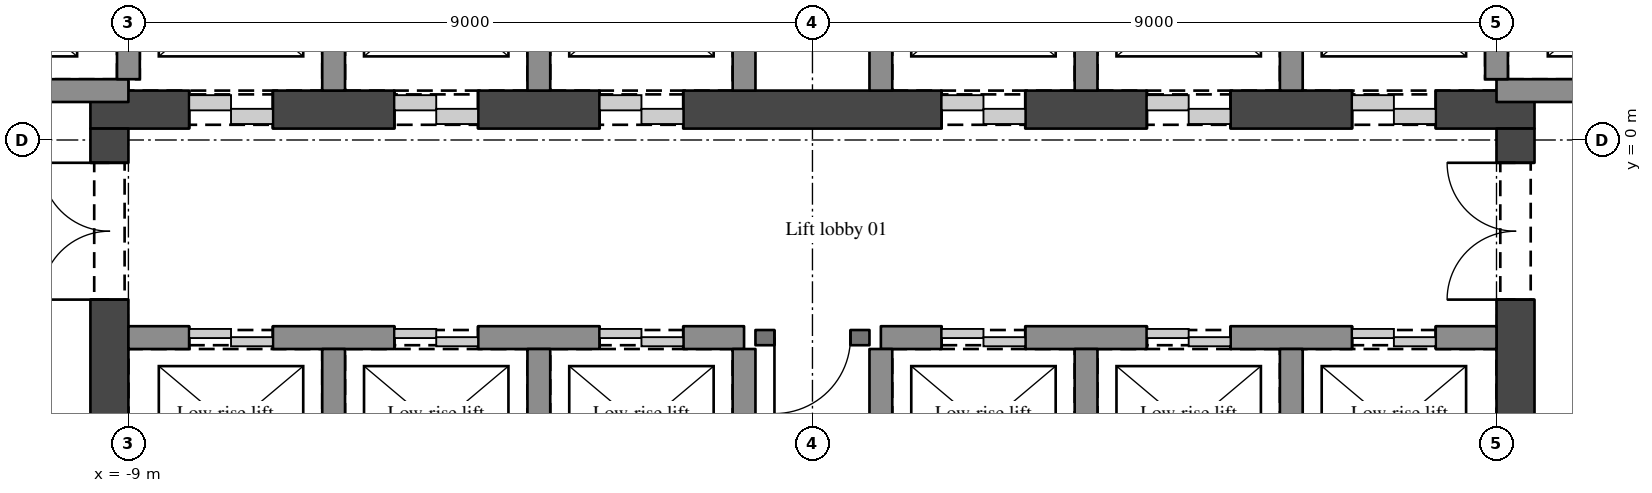
"""IFC4 building model, lengths in metres.
Left out: names, types, materials, properties, quantities, classifications, styles, units other than length and angle.
Written with IfcOpenShell. Run it as: python <this file> out.ifc"""

import sys

from ifc_helpers import new_model, si_unit, direction, frame, frame_2d, origin, place, context, subcontext, project, spatial, rectangle, extrude, element, fill, save


model = new_model("IFC4")
c1 = context("Model", 3, precision=1e-05, world=origin(), true_north=direction((0.0, 1.0)))
c2 = subcontext(c1, "Body", "Model", "MODEL_VIEW")
j1 = project(units=[si_unit("LENGTHUNIT", "METRE"), si_unit("PLANEANGLEUNIT", "RADIAN")], contexts=[c1])
p1 = place(None, origin())
s1 = spatial("IfcSite", under=j1, at=p1, CompositionType="ELEMENT")
p2 = place(p1, origin())
s2 = spatial("IfcBuilding", under=s1, at=p2, CompositionType="ELEMENT")
p3 = place(p2, frame((0.0, 0.0, 108.9)))
s3 = spatial("IfcBuildingStorey", under=s2, at=p3, CompositionType="ELEMENT", Elevation=108.9)
p4 = place(p3, frame((-9.5, 0.4, 0.0), z_axis=(0.0, 0.0, 1.0), x_axis=(1.0, 0.0, 0.0)))
e1 = element("IfcWall", 1, at=p4, inside=s3, PredefinedType="SHEAR", context=c2, shape_type="SweptSolid", body=[
    extrude(rectangle(XDim=19.0, YDim=0.5, at=frame_2d((9.5, 0.0))), origin(), (0.0, 0.0, 1.0), 5.4),
])
p5 = place(p4, frame((1.3, 0.0, 0.0)))
e2 = element("IfcOpeningElement", 2, at=p5, cuts=e1, PredefinedType="OPENING", context=c2, shape_type="SweptSolid", body=[
    extrude(rectangle(XDim=1.1, YDim=2.1, at=frame_2d((0.55, 1.05))), frame((0.0, 0.26, 0.0), z_axis=(0.0, -1.0, 0.0), x_axis=(1.0, 0.0, 0.0)), (0.0, 0.0, 1.0), 0.52),
])
p6 = place(p4, frame((4.0, 0.0, 0.0)))
e3 = element("IfcOpeningElement", 3, at=p6, cuts=e1, PredefinedType="OPENING", context=c2, shape_type="SweptSolid", body=[
    extrude(rectangle(XDim=1.1, YDim=2.1, at=frame_2d((0.55, 1.05))), frame((0.0, 0.26, 0.0), z_axis=(0.0, -1.0, 0.0), x_axis=(1.0, 0.0, 0.0)), (0.0, 0.0, 1.0), 0.52),
])
p7 = place(p4, frame((6.7, 0.0, 0.0)))
e4 = element("IfcOpeningElement", 4, at=p7, cuts=e1, PredefinedType="OPENING", context=c2, shape_type="SweptSolid", body=[
    extrude(rectangle(XDim=1.1, YDim=2.1, at=frame_2d((0.55, 1.05))), frame((0.0, 0.26, 0.0), z_axis=(0.0, -1.0, 0.0), x_axis=(1.0, 0.0, 0.0)), (0.0, 0.0, 1.0), 0.52),
])
p8 = place(p4, frame((11.2, 0.0, 0.0)))
e5 = element("IfcOpeningElement", 5, at=p8, cuts=e1, PredefinedType="OPENING", context=c2, shape_type="SweptSolid", body=[
    extrude(rectangle(XDim=1.1, YDim=2.1, at=frame_2d((0.55, 1.05))), frame((0.0, 0.26, 0.0), z_axis=(0.0, -1.0, 0.0), x_axis=(1.0, 0.0, 0.0)), (0.0, 0.0, 1.0), 0.52),
])
p9 = place(p4, frame((13.9, 0.0, 0.0)))
e6 = element("IfcOpeningElement", 6, at=p9, cuts=e1, PredefinedType="OPENING", context=c2, shape_type="SweptSolid", body=[
    extrude(rectangle(XDim=1.1, YDim=2.1, at=frame_2d((0.55, 1.05))), frame((0.0, 0.26, 0.0), z_axis=(0.0, -1.0, 0.0), x_axis=(1.0, 0.0, 0.0)), (0.0, 0.0, 1.0), 0.52),
])
p10 = place(p4, frame((16.6, 0.0, 0.0)))
e7 = element("IfcOpeningElement", 7, at=p10, cuts=e1, PredefinedType="OPENING", context=c2, shape_type="SweptSolid", body=[
    extrude(rectangle(XDim=1.1, YDim=2.1, at=frame_2d((0.55, 1.05))), frame((0.0, 0.26, 0.0), z_axis=(0.0, -1.0, 0.0), x_axis=(1.0, 0.0, 0.0)), (0.0, 0.0, 1.0), 0.52),
])
p11 = place(p3, frame((-9.25, -11.5, 0.0), z_axis=(0.0, 0.0, 1.0), x_axis=(0.0, 1.0, 0.0)))
e8 = element("IfcWall", 8, at=p11, inside=s3, PredefinedType="SHEAR", context=c2, shape_type="SweptSolid", body=[
    extrude(rectangle(XDim=11.65, YDim=0.5, at=frame_2d((5.825, 0.0))), origin(), (0.0, 0.0, 1.0), 5.4),
])
p12 = place(p11, frame((9.4, 0.0, 0.0)))
e9 = element("IfcOpeningElement", 9, at=p12, cuts=e8, PredefinedType="OPENING", context=c2, shape_type="SweptSolid", body=[
    extrude(rectangle(XDim=1.8, YDim=2.1, at=frame_2d((0.9, 1.05))), frame((0.0, 0.26, 0.0), z_axis=(0.0, -1.0, 0.0), x_axis=(1.0, 0.0, 0.0)), (0.0, 0.0, 1.0), 0.52),
])
p13 = place(p11, frame((5.25, 0.0, 0.0)))
e10 = element("IfcOpeningElement", 10, at=p13, cuts=e8, PredefinedType="OPENING", context=c2, shape_type="SweptSolid", body=[
    extrude(rectangle(XDim=1.1, YDim=2.1, at=frame_2d((0.55, 1.05))), frame((0.0, 0.26, 0.0), z_axis=(0.0, -1.0, 0.0), x_axis=(1.0, 0.0, 0.0)), (0.0, 0.0, 1.0), 0.52),
])
p14 = place(p3, frame((9.25, -11.5, 0.0), z_axis=(0.0, 0.0, 1.0), x_axis=(0.0, 1.0, 0.0)))
e11 = element("IfcWall", 11, at=p14, inside=s3, PredefinedType="SHEAR", context=c2, shape_type="SweptSolid", body=[
    extrude(rectangle(XDim=11.65, YDim=0.5, at=frame_2d((5.825, 0.0))), origin(), (0.0, 0.0, 1.0), 5.4),
])
p15 = place(p14, frame((9.4, 0.0, 0.0)))
e12 = element("IfcOpeningElement", 12, at=p15, cuts=e11, PredefinedType="OPENING", context=c2, shape_type="SweptSolid", body=[
    extrude(rectangle(XDim=1.8, YDim=2.1, at=frame_2d((0.9, 1.05))), frame((0.0, 0.26, 0.0), z_axis=(0.0, -1.0, 0.0), x_axis=(1.0, 0.0, 0.0)), (0.0, 0.0, 1.0), 0.52),
])
p16 = place(p14, frame((5.25, 0.0, 0.0)))
e13 = element("IfcOpeningElement", 13, at=p16, cuts=e11, PredefinedType="OPENING", context=c2, shape_type="SweptSolid", body=[
    extrude(rectangle(XDim=1.1, YDim=2.1, at=frame_2d((0.55, 1.05))), frame((0.0, 0.26, 0.0), z_axis=(0.0, -1.0, 0.0), x_axis=(1.0, 0.0, 0.0)), (0.0, 0.0, 1.0), 0.52),
])
p17 = place(p3, frame((-9.0, -2.6, 0.0), z_axis=(0.0, 0.0, 1.0), x_axis=(1.0, 0.0, 0.0)))
e14 = element("IfcWall", 14, at=p17, inside=s3, PredefinedType="SHEAR", context=c2, shape_type="SweptSolid", body=[
    extrude(rectangle(XDim=8.1, YDim=0.3, at=frame_2d((4.05, 0.0))), origin(), (0.0, 0.0, 1.0), 5.4),
])
p18 = place(p17, frame((0.8, 0.0, 0.0)))
e15 = element("IfcOpeningElement", 15, at=p18, cuts=e14, PredefinedType="OPENING", context=c2, shape_type="SweptSolid", body=[
    extrude(rectangle(XDim=1.1, YDim=2.1, at=frame_2d((0.55, 1.05))), frame((0.0, 0.16, 0.0), z_axis=(0.0, -1.0, 0.0), x_axis=(1.0, 0.0, 0.0)), (0.0, 0.0, 1.0), 0.32),
])
p19 = place(p17, frame((3.5, 0.0, 0.0)))
e16 = element("IfcOpeningElement", 16, at=p19, cuts=e14, PredefinedType="OPENING", context=c2, shape_type="SweptSolid", body=[
    extrude(rectangle(XDim=1.1, YDim=2.1, at=frame_2d((0.55, 1.05))), frame((0.0, 0.16, 0.0), z_axis=(0.0, -1.0, 0.0), x_axis=(1.0, 0.0, 0.0)), (0.0, 0.0, 1.0), 0.32),
])
p20 = place(p17, frame((6.2, 0.0, 0.0)))
e17 = element("IfcOpeningElement", 17, at=p20, cuts=e14, PredefinedType="OPENING", context=c2, shape_type="SweptSolid", body=[
    extrude(rectangle(XDim=1.1, YDim=2.1, at=frame_2d((0.55, 1.05))), frame((0.0, 0.16, 0.0), z_axis=(0.0, -1.0, 0.0), x_axis=(1.0, 0.0, 0.0)), (0.0, 0.0, 1.0), 0.32),
])
p21 = place(p3, frame((0.75, -2.6, 0.0), z_axis=(0.0, 0.0, 1.0), x_axis=(-1.0, 0.0, 0.0)))
e18 = element("IfcWall", 18, at=p21, inside=s3, PredefinedType="SOLIDWALL", context=c2, shape_type="SweptSolid", body=[
    extrude(rectangle(XDim=1.5, YDim=0.2, at=frame_2d((0.75, 0.0))), origin(), (0.0, 0.0, 1.0), 5.1),
])
p22 = place(p21, frame((0.25, 0.0, 0.0)))
e19 = element("IfcOpeningElement", 19, at=p22, cuts=e18, PredefinedType="OPENING", context=c2, shape_type="SweptSolid", body=[
    extrude(rectangle(XDim=1.0, YDim=2.1, at=frame_2d((0.5, 1.05))), frame((0.0, 0.11, 0.0), z_axis=(0.0, -1.0, 0.0), x_axis=(1.0, 0.0, 0.0)), (0.0, 0.0, 1.0), 0.22),
])
p23 = place(p3, frame((0.9, -2.6, 0.0), z_axis=(0.0, 0.0, 1.0), x_axis=(1.0, 0.0, 0.0)))
e20 = element("IfcWall", 20, at=p23, inside=s3, PredefinedType="SHEAR", context=c2, shape_type="SweptSolid", body=[
    extrude(rectangle(XDim=8.1, YDim=0.3, at=frame_2d((4.05, 0.0))), origin(), (0.0, 0.0, 1.0), 5.4),
])
p24 = place(p23, frame((0.8, 0.0, 0.0)))
e21 = element("IfcOpeningElement", 21, at=p24, cuts=e20, PredefinedType="OPENING", context=c2, shape_type="SweptSolid", body=[
    extrude(rectangle(XDim=1.1, YDim=2.1, at=frame_2d((0.55, 1.05))), frame((0.0, 0.16, 0.0), z_axis=(0.0, -1.0, 0.0), x_axis=(1.0, 0.0, 0.0)), (0.0, 0.0, 1.0), 0.32),
])
p25 = place(p23, frame((3.5, 0.0, 0.0)))
e22 = element("IfcOpeningElement", 22, at=p25, cuts=e20, PredefinedType="OPENING", context=c2, shape_type="SweptSolid", body=[
    extrude(rectangle(XDim=1.1, YDim=2.1, at=frame_2d((0.55, 1.05))), frame((0.0, 0.16, 0.0), z_axis=(0.0, -1.0, 0.0), x_axis=(1.0, 0.0, 0.0)), (0.0, 0.0, 1.0), 0.32),
])
p26 = place(p23, frame((6.2, 0.0, 0.0)))
e23 = element("IfcOpeningElement", 23, at=p26, cuts=e20, PredefinedType="OPENING", context=c2, shape_type="SweptSolid", body=[
    extrude(rectangle(XDim=1.1, YDim=2.1, at=frame_2d((0.55, 1.05))), frame((0.0, 0.16, 0.0), z_axis=(0.0, -1.0, 0.0), x_axis=(1.0, 0.0, 0.0)), (0.0, 0.0, 1.0), 0.32),
])
p27 = place(p3, frame((-9.0, 0.65, 0.0), z_axis=(0.0, 0.0, 1.0), x_axis=(-1.0, 0.0, 0.0)))
e24 = element("IfcWall", 24, at=p27, inside=s3, PredefinedType="SHEAR", context=c2, shape_type="SweptSolid", body=[
    extrude(rectangle(XDim=3.25, YDim=0.3, at=frame_2d((1.625, 0.0))), origin(), (0.0, 0.0, 1.0), 5.4),
])
p28 = place(p27, frame((1.05, 0.0, 0.0)))
e25 = element("IfcOpeningElement", 25, at=p28, cuts=e24, PredefinedType="OPENING", context=c2, shape_type="SweptSolid", body=[
    extrude(rectangle(XDim=1.1, YDim=2.1, at=frame_2d((0.55, 1.05))), frame((0.0, 0.16, 0.0), z_axis=(0.0, -1.0, 0.0), x_axis=(1.0, 0.0, 0.0)), (0.0, 0.0, 1.0), 0.32),
])
p29 = place(p3, frame((12.25, 0.65, 0.0), z_axis=(0.0, 0.0, 1.0), x_axis=(-1.0, 0.0, 0.0)))
e26 = element("IfcWall", 26, at=p29, inside=s3, PredefinedType="SHEAR", context=c2, shape_type="SweptSolid", body=[
    extrude(rectangle(XDim=3.25, YDim=0.3, at=frame_2d((1.625, 0.0))), origin(), (0.0, 0.0, 1.0), 5.4),
])
p30 = place(p29, frame((1.1, 0.0, 0.0)))
e27 = element("IfcOpeningElement", 27, at=p30, cuts=e26, PredefinedType="OPENING", context=c2, shape_type="SweptSolid", body=[
    extrude(rectangle(XDim=1.1, YDim=2.1, at=frame_2d((0.55, 1.05))), frame((0.0, 0.16, 0.0), z_axis=(0.0, -1.0, 0.0), x_axis=(1.0, 0.0, 0.0)), (0.0, 0.0, 1.0), 0.32),
])
p31 = place(p3, frame((-9.0, 0.8, 0.0), z_axis=(0.0, 0.0, 1.0), x_axis=(0.0, 1.0, 0.0)))
e28 = element("IfcWall", 28, at=p31, inside=s3, PredefinedType="SHEAR", context=c2, shape_type="SweptSolid", body=[
    extrude(rectangle(XDim=2.35, YDim=0.3, at=frame_2d((1.175, 0.0))), origin(), (0.0, 0.0, 1.0), 5.4),
])
p32 = place(p3, frame((-6.3, -4.8, 0.0), z_axis=(0.0, 0.0, 1.0), x_axis=(0.0, 1.0, 0.0)))
e29 = element("IfcWall", 29, at=p32, inside=s3, PredefinedType="SHEAR", context=c2, shape_type="SweptSolid", body=[
    extrude(rectangle(XDim=2.05, YDim=0.3, at=frame_2d((1.025, 0.0))), origin(), (0.0, 0.0, 1.0), 5.4),
])
p33 = place(p3, frame((-6.3, 0.65, 0.0), z_axis=(0.0, 0.0, 1.0), x_axis=(0.0, 1.0, 0.0)))
e30 = element("IfcWall", 30, at=p33, inside=s3, PredefinedType="SHEAR", context=c2, shape_type="SweptSolid", body=[
    extrude(rectangle(XDim=2.5, YDim=0.3, at=frame_2d((1.25, 0.0))), origin(), (0.0, 0.0, 1.0), 5.4),
])
p34 = place(p3, frame((-3.6, -4.8, 0.0), z_axis=(0.0, 0.0, 1.0), x_axis=(0.0, 1.0, 0.0)))
e31 = element("IfcWall", 31, at=p34, inside=s3, PredefinedType="SHEAR", context=c2, shape_type="SweptSolid", body=[
    extrude(rectangle(XDim=2.05, YDim=0.3, at=frame_2d((1.025, 0.0))), origin(), (0.0, 0.0, 1.0), 5.4),
])
p35 = place(p3, frame((-3.6, 0.65, 0.0), z_axis=(0.0, 0.0, 1.0), x_axis=(0.0, 1.0, 0.0)))
e32 = element("IfcWall", 32, at=p35, inside=s3, PredefinedType="SHEAR", context=c2, shape_type="SweptSolid", body=[
    extrude(rectangle(XDim=2.5, YDim=0.3, at=frame_2d((1.25, 0.0))), origin(), (0.0, 0.0, 1.0), 5.4),
])
p36 = place(p3, frame((-0.9, -4.8, 0.0), z_axis=(0.0, 0.0, 1.0), x_axis=(0.0, 1.0, 0.0)))
e33 = element("IfcWall", 33, at=p36, inside=s3, PredefinedType="SHEAR", context=c2, shape_type="SweptSolid", body=[
    extrude(rectangle(XDim=2.05, YDim=0.3, at=frame_2d((1.025, 0.0))), origin(), (0.0, 0.0, 1.0), 5.4),
])
p37 = place(p3, frame((-0.9, 0.65, 0.0), z_axis=(0.0, 0.0, 1.0), x_axis=(0.0, 1.0, 0.0)))
e34 = element("IfcWall", 34, at=p37, inside=s3, PredefinedType="SHEAR", context=c2, shape_type="SweptSolid", body=[
    extrude(rectangle(XDim=2.5, YDim=0.3, at=frame_2d((1.25, 0.0))), origin(), (0.0, 0.0, 1.0), 5.4),
])
p38 = place(p3, frame((0.9, -4.8, 0.0), z_axis=(0.0, 0.0, 1.0), x_axis=(0.0, 1.0, 0.0)))
e35 = element("IfcWall", 35, at=p38, inside=s3, PredefinedType="SHEAR", context=c2, shape_type="SweptSolid", body=[
    extrude(rectangle(XDim=2.05, YDim=0.3, at=frame_2d((1.025, 0.0))), origin(), (0.0, 0.0, 1.0), 5.4),
])
p39 = place(p3, frame((0.9, 0.65, 0.0), z_axis=(0.0, 0.0, 1.0), x_axis=(0.0, 1.0, 0.0)))
e36 = element("IfcWall", 36, at=p39, inside=s3, PredefinedType="SHEAR", context=c2, shape_type="SweptSolid", body=[
    extrude(rectangle(XDim=2.5, YDim=0.3, at=frame_2d((1.25, 0.0))), origin(), (0.0, 0.0, 1.0), 5.4),
])
p40 = place(p3, frame((3.6, -4.8, 0.0), z_axis=(0.0, 0.0, 1.0), x_axis=(0.0, 1.0, 0.0)))
e37 = element("IfcWall", 37, at=p40, inside=s3, PredefinedType="SHEAR", context=c2, shape_type="SweptSolid", body=[
    extrude(rectangle(XDim=2.05, YDim=0.3, at=frame_2d((1.025, 0.0))), origin(), (0.0, 0.0, 1.0), 5.4),
])
p41 = place(p3, frame((3.6, 0.65, 0.0), z_axis=(0.0, 0.0, 1.0), x_axis=(0.0, 1.0, 0.0)))
e38 = element("IfcWall", 38, at=p41, inside=s3, PredefinedType="SHEAR", context=c2, shape_type="SweptSolid", body=[
    extrude(rectangle(XDim=2.5, YDim=0.3, at=frame_2d((1.25, 0.0))), origin(), (0.0, 0.0, 1.0), 5.4),
])
p42 = place(p3, frame((6.3, -4.8, 0.0), z_axis=(0.0, 0.0, 1.0), x_axis=(0.0, 1.0, 0.0)))
e39 = element("IfcWall", 39, at=p42, inside=s3, PredefinedType="SHEAR", context=c2, shape_type="SweptSolid", body=[
    extrude(rectangle(XDim=2.05, YDim=0.3, at=frame_2d((1.025, 0.0))), origin(), (0.0, 0.0, 1.0), 5.4),
])
p43 = place(p3, frame((6.3, 0.65, 0.0), z_axis=(0.0, 0.0, 1.0), x_axis=(0.0, 1.0, 0.0)))
e40 = element("IfcWall", 40, at=p43, inside=s3, PredefinedType="SHEAR", context=c2, shape_type="SweptSolid", body=[
    extrude(rectangle(XDim=2.5, YDim=0.3, at=frame_2d((1.25, 0.0))), origin(), (0.0, 0.0, 1.0), 5.4),
])
p44 = place(p3, frame((9.0, 0.8, 0.0), z_axis=(0.0, 0.0, 1.0), x_axis=(0.0, 1.0, 0.0)))
e41 = element("IfcWall", 41, at=p44, inside=s3, PredefinedType="SHEAR", context=c2, shape_type="SweptSolid", body=[
    extrude(rectangle(XDim=2.35, YDim=0.3, at=frame_2d((1.175, 0.0))), origin(), (0.0, 0.0, 1.0), 5.4),
])
p45 = place(p15, origin())
e42 = element("IfcDoor", 42, at=p45, inside=s3, OperationType="DOUBLE_DOOR_SINGLE_SWING", PredefinedType="DOOR", context=c2, shape_type="SweptSolid", body=[
    extrude(rectangle(XDim=1.8, YDim=2.1, at=frame_2d((0.9, 1.05))), frame((0.0, 0.025, 0.0), z_axis=(0.0, -1.0, 0.0), x_axis=(1.0, 0.0, 0.0)), (0.0, 0.0, 1.0), 0.05),
])
fill(e12, e42)
p46 = place(p12, origin())
e43 = element("IfcDoor", 43, at=p46, inside=s3, OperationType="DOUBLE_DOOR_SINGLE_SWING", PredefinedType="DOOR", context=c2, shape_type="SweptSolid", body=[
    extrude(rectangle(XDim=1.8, YDim=2.1, at=frame_2d((0.9, 1.05))), frame((0.0, 0.025, 0.0), z_axis=(0.0, -1.0, 0.0), x_axis=(1.0, 0.0, 0.0)), (0.0, 0.0, 1.0), 0.05),
])
fill(e9, e43)
p47 = place(p22, origin())
e44 = element("IfcDoor", 44, at=p47, inside=s3, OperationType="SINGLE_SWING_RIGHT", PredefinedType="DOOR", context=c2, shape_type="SweptSolid", body=[
    extrude(rectangle(XDim=1.0, YDim=2.1, at=frame_2d((0.5, 1.05))), frame((0.0, 0.025, 0.0), z_axis=(0.0, -1.0, 0.0), x_axis=(1.0, 0.0, 0.0)), (0.0, 0.0, 1.0), 0.05),
])
fill(e19, e44)
p48 = place(p18, origin())
e45 = element("IfcDoor", 45, at=p48, inside=s3, OperationType="DOUBLE_DOOR_SLIDING", PredefinedType="DOOR", context=c2, shape_type="SweptSolid", body=[
    extrude(rectangle(XDim=1.1, YDim=2.1, at=frame_2d((0.55, 1.05))), frame((0.0, 0.025, 0.0), z_axis=(0.0, -1.0, 0.0), x_axis=(1.0, 0.0, 0.0)), (0.0, 0.0, 1.0), 0.05),
])
fill(e15, e45)
p49 = place(p19, origin())
e46 = element("IfcDoor", 46, at=p49, inside=s3, OperationType="DOUBLE_DOOR_SLIDING", PredefinedType="DOOR", context=c2, shape_type="SweptSolid", body=[
    extrude(rectangle(XDim=1.1, YDim=2.1, at=frame_2d((0.55, 1.05))), frame((0.0, 0.025, 0.0), z_axis=(0.0, -1.0, 0.0), x_axis=(1.0, 0.0, 0.0)), (0.0, 0.0, 1.0), 0.05),
])
fill(e16, e46)
p50 = place(p20, origin())
e47 = element("IfcDoor", 47, at=p50, inside=s3, OperationType="DOUBLE_DOOR_SLIDING", PredefinedType="DOOR", context=c2, shape_type="SweptSolid", body=[
    extrude(rectangle(XDim=1.1, YDim=2.1, at=frame_2d((0.55, 1.05))), frame((0.0, 0.025, 0.0), z_axis=(0.0, -1.0, 0.0), x_axis=(1.0, 0.0, 0.0)), (0.0, 0.0, 1.0), 0.05),
])
fill(e17, e47)
p51 = place(p24, origin())
e48 = element("IfcDoor", 48, at=p51, inside=s3, OperationType="DOUBLE_DOOR_SLIDING", PredefinedType="DOOR", context=c2, shape_type="SweptSolid", body=[
    extrude(rectangle(XDim=1.1, YDim=2.1, at=frame_2d((0.55, 1.05))), frame((0.0, 0.025, 0.0), z_axis=(0.0, -1.0, 0.0), x_axis=(1.0, 0.0, 0.0)), (0.0, 0.0, 1.0), 0.05),
])
fill(e21, e48)
p52 = place(p25, origin())
e49 = element("IfcDoor", 49, at=p52, inside=s3, OperationType="DOUBLE_DOOR_SLIDING", PredefinedType="DOOR", context=c2, shape_type="SweptSolid", body=[
    extrude(rectangle(XDim=1.1, YDim=2.1, at=frame_2d((0.55, 1.05))), frame((0.0, 0.025, 0.0), z_axis=(0.0, -1.0, 0.0), x_axis=(1.0, 0.0, 0.0)), (0.0, 0.0, 1.0), 0.05),
])
fill(e22, e49)
p53 = place(p26, origin())
e50 = element("IfcDoor", 50, at=p53, inside=s3, OperationType="DOUBLE_DOOR_SLIDING", PredefinedType="DOOR", context=c2, shape_type="SweptSolid", body=[
    extrude(rectangle(XDim=1.1, YDim=2.1, at=frame_2d((0.55, 1.05))), frame((0.0, 0.025, 0.0), z_axis=(0.0, -1.0, 0.0), x_axis=(1.0, 0.0, 0.0)), (0.0, 0.0, 1.0), 0.05),
])
fill(e23, e50)
p54 = place(p5, origin())
e51 = element("IfcDoor", 51, at=p54, inside=s3, OperationType="DOUBLE_DOOR_SLIDING", PredefinedType="DOOR", context=c2, shape_type="SweptSolid", body=[
    extrude(rectangle(XDim=1.1, YDim=2.1, at=frame_2d((0.55, 1.05))), frame((0.0, 0.025, 0.0), z_axis=(0.0, -1.0, 0.0), x_axis=(1.0, 0.0, 0.0)), (0.0, 0.0, 1.0), 0.05),
])
fill(e2, e51)
p55 = place(p6, origin())
e52 = element("IfcDoor", 52, at=p55, inside=s3, OperationType="DOUBLE_DOOR_SLIDING", PredefinedType="DOOR", context=c2, shape_type="SweptSolid", body=[
    extrude(rectangle(XDim=1.1, YDim=2.1, at=frame_2d((0.55, 1.05))), frame((0.0, 0.025, 0.0), z_axis=(0.0, -1.0, 0.0), x_axis=(1.0, 0.0, 0.0)), (0.0, 0.0, 1.0), 0.05),
])
fill(e3, e52)
p56 = place(p7, origin())
e53 = element("IfcDoor", 53, at=p56, inside=s3, OperationType="DOUBLE_DOOR_SLIDING", PredefinedType="DOOR", context=c2, shape_type="SweptSolid", body=[
    extrude(rectangle(XDim=1.1, YDim=2.1, at=frame_2d((0.55, 1.05))), frame((0.0, 0.025, 0.0), z_axis=(0.0, -1.0, 0.0), x_axis=(1.0, 0.0, 0.0)), (0.0, 0.0, 1.0), 0.05),
])
fill(e4, e53)
p57 = place(p8, origin())
e54 = element("IfcDoor", 54, at=p57, inside=s3, OperationType="DOUBLE_DOOR_SLIDING", PredefinedType="DOOR", context=c2, shape_type="SweptSolid", body=[
    extrude(rectangle(XDim=1.1, YDim=2.1, at=frame_2d((0.55, 1.05))), frame((0.0, 0.025, 0.0), z_axis=(0.0, -1.0, 0.0), x_axis=(1.0, 0.0, 0.0)), (0.0, 0.0, 1.0), 0.05),
])
fill(e5, e54)
p58 = place(p9, origin())
e55 = element("IfcDoor", 55, at=p58, inside=s3, OperationType="DOUBLE_DOOR_SLIDING", PredefinedType="DOOR", context=c2, shape_type="SweptSolid", body=[
    extrude(rectangle(XDim=1.1, YDim=2.1, at=frame_2d((0.55, 1.05))), frame((0.0, 0.025, 0.0), z_axis=(0.0, -1.0, 0.0), x_axis=(1.0, 0.0, 0.0)), (0.0, 0.0, 1.0), 0.05),
])
fill(e6, e55)
p59 = place(p10, origin())
e56 = element("IfcDoor", 56, at=p59, inside=s3, OperationType="DOUBLE_DOOR_SLIDING", PredefinedType="DOOR", context=c2, shape_type="SweptSolid", body=[
    extrude(rectangle(XDim=1.1, YDim=2.1, at=frame_2d((0.55, 1.05))), frame((0.0, 0.025, 0.0), z_axis=(0.0, -1.0, 0.0), x_axis=(1.0, 0.0, 0.0)), (0.0, 0.0, 1.0), 0.05),
])
fill(e7, e56)
save(model, sys.argv[1])
